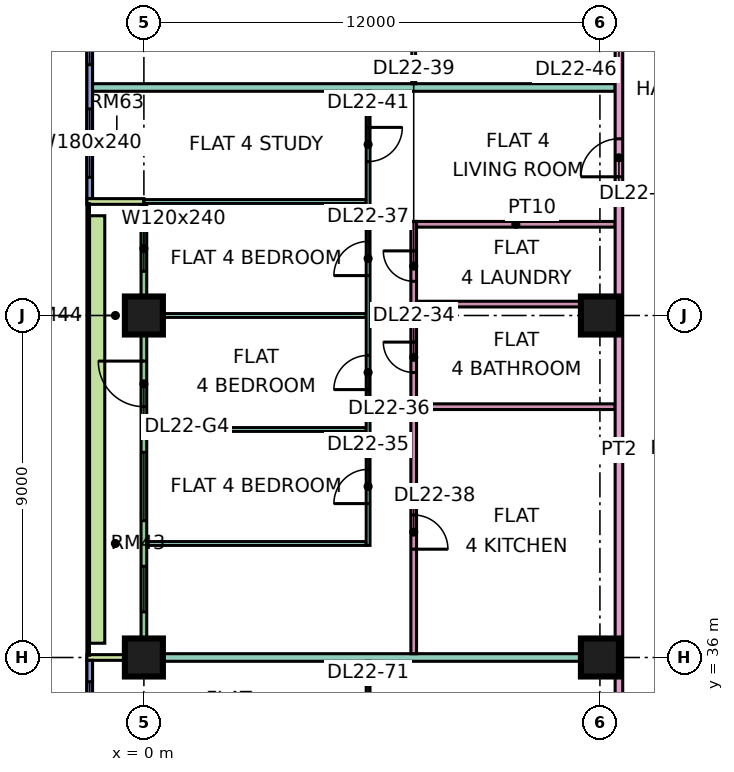
"""IFC4 building model, lengths in metres.
Left out: names, types, materials, properties, quantities, classifications, styles, units other than length and angle.
Written with IfcOpenShell. Run it as: python <this file> out.ifc"""

import sys

from ifc_helpers import new_model, si_unit, direction, frame, frame_2d, origin, origin_2d, place, context, subcontext, project, spatial, rectangle, extrude, element, fill, save


model = new_model("IFC4")
c1 = context("Model", 3, precision=1e-05, world=origin(), true_north=direction((0.0, 1.0)))
c2 = subcontext(c1, "Body", "Model", "MODEL_VIEW")
j1 = project(units=[si_unit("LENGTHUNIT", "METRE"), si_unit("PLANEANGLEUNIT", "RADIAN")], contexts=[c1])
p1 = place(None, origin())
s1 = spatial("IfcSite", under=j1, at=p1, CompositionType="ELEMENT")
p2 = place(p1, origin())
s2 = spatial("IfcBuilding", under=s1, at=p2, CompositionType="ELEMENT")
p3 = place(p2, frame((0.0, 0.0, 99.4)))
s3 = spatial("IfcBuildingStorey", under=s2, at=p3, CompositionType="ELEMENT", Elevation=99.4)
p4 = place(p3, frame((0.0, 36.0, 0.0), z_axis=(0.0, 0.0, 1.0), x_axis=(1.0, 0.0, 0.0)))
e1 = element("IfcColumn", 1, at=p4, inside=s3, PredefinedType="COLUMN", context=c2, shape_type="SweptSolid", body=[
    extrude(rectangle(XDim=1.0, YDim=1.0, at=origin_2d()), origin(), (0.0, 0.0, 1.0), 3.75),
])
for number, where, z_axis, x_axis in (
    (2, (0.0, 45.0, 0.0), (0.0, 0.0, 1.0), (1.0, 0.0, 0.0)),
    (3, (12.0, 36.0, 0.0), (0.0, 0.0, 1.0), (1.0, 0.0, 0.0)),
    (4, (12.0, 45.0, 0.0), (0.0, 0.0, 1.0), (1.0, 0.0, 0.0)),
):
    element("IfcColumn", number, at=place(p3, frame(where, z_axis=z_axis, x_axis=x_axis)), inside=s3, PredefinedType="COLUMN", context=c2, shape_type="SweptSolid", body=[
        extrude(rectangle(XDim=1.0, YDim=1.0, at=origin_2d()), origin(), (0.0, 0.0, 1.0), 3.75),
    ])
p5 = place(p3, frame((-1.425, 61.5, 0.0), z_axis=(0.0, 0.0, 1.0), x_axis=(0.0, -1.0, 0.0)))
e5 = element("IfcWall", 5, at=p5, inside=s3, PredefinedType="SOLIDWALL", context=c2, shape_type="SweptSolid", body=[
    extrude(rectangle(XDim=13.425, YDim=0.15, at=frame_2d((6.712, 0.0))), origin(), (0.0, 0.0, 1.0), 3.35),
])
p6 = place(p5, frame((0.3, 0.0, 0.45)))
e6 = element("IfcOpeningElement", 6, at=p6, cuts=e5, PredefinedType="OPENING", context=c2, shape_type="SweptSolid", body=[
    extrude(rectangle(XDim=0.9, YDim=2.4, at=frame_2d((0.45, 1.2))), frame((0.0, 0.085, 0.0), z_axis=(0.0, -1.0, 0.0), x_axis=(1.0, 0.0, 0.0)), (0.0, 0.0, 1.0), 0.17),
])
p7 = place(p5, frame((2.1, 0.0, 0.45)))
e7 = element("IfcOpeningElement", 7, at=p7, cuts=e5, PredefinedType="OPENING", context=c2, shape_type="SweptSolid", body=[
    extrude(rectangle(XDim=4.8, YDim=2.4, at=frame_2d((2.4, 1.2))), frame((0.0, 0.085, 0.0), z_axis=(0.0, -1.0, 0.0), x_axis=(1.0, 0.0, 0.0)), (0.0, 0.0, 1.0), 0.17),
])
p8 = place(p5, frame((8.1, 0.0, 0.45)))
e8 = element("IfcOpeningElement", 8, at=p8, cuts=e5, PredefinedType="OPENING", context=c2, shape_type="SweptSolid", body=[
    extrude(rectangle(XDim=1.8, YDim=2.4, at=frame_2d((0.9, 1.2))), frame((0.0, 0.085, 0.0), z_axis=(0.0, -1.0, 0.0), x_axis=(1.0, 0.0, 0.0)), (0.0, 0.0, 1.0), 0.17),
])
p9 = place(p5, frame((11.062, 0.0, 0.45)))
e9 = element("IfcOpeningElement", 9, at=p9, cuts=e5, PredefinedType="OPENING", context=c2, shape_type="SweptSolid", body=[
    extrude(rectangle(XDim=1.8, YDim=2.4, at=frame_2d((0.9, 1.2))), frame((0.0, 0.085, 0.0), z_axis=(0.0, -1.0, 0.0), x_axis=(1.0, 0.0, 0.0)), (0.0, 0.0, 1.0), 0.17),
])
p10 = place(p3, frame((0.0, 47.925, 0.0), z_axis=(0.0, 0.0, 1.0), x_axis=(0.0, -1.0, 0.0)))
e10 = element("IfcWall", 10, at=p10, inside=s3, PredefinedType="SOLIDWALL", context=c2, shape_type="SweptSolid", body=[
    extrude(rectangle(XDim=11.85, YDim=0.15, at=frame_2d((5.925, 0.0))), origin(), (0.0, 0.0, 1.0), 3.35),
])
p11 = place(p10, frame((0.562, 0.0, 0.45)))
e11 = element("IfcOpeningElement", 11, at=p11, cuts=e10, PredefinedType="OPENING", context=c2, shape_type="SweptSolid", body=[
    extrude(rectangle(XDim=1.2, YDim=2.4, at=frame_2d((0.6, 1.2))), frame((0.0, 0.085, 0.0), z_axis=(0.0, -1.0, 0.0), x_axis=(1.0, 0.0, 0.0)), (0.0, 0.0, 1.0), 0.17),
])
p12 = place(p10, frame((4.125, 0.0, 0.0)))
e12 = element("IfcOpeningElement", 12, at=p12, cuts=e10, PredefinedType="OPENING", context=c2, shape_type="SweptSolid", body=[
    extrude(rectangle(XDim=1.2, YDim=2.4, at=frame_2d((0.6, 1.2))), frame((0.0, 0.085, 0.0), z_axis=(0.0, -1.0, 0.0), x_axis=(1.0, 0.0, 0.0)), (0.0, 0.0, 1.0), 0.17),
])
p13 = place(p10, frame((6.525, 0.0, 0.45)))
e13 = element("IfcOpeningElement", 13, at=p13, cuts=e10, PredefinedType="OPENING", context=c2, shape_type="SweptSolid", body=[
    extrude(rectangle(XDim=1.8, YDim=2.4, at=frame_2d((0.9, 1.2))), frame((0.0, 0.085, 0.0), z_axis=(0.0, -1.0, 0.0), x_axis=(1.0, 0.0, 0.0)), (0.0, 0.0, 1.0), 0.17),
])
p14 = place(p10, frame((9.525, 0.0, 0.45)))
e14 = element("IfcOpeningElement", 14, at=p14, cuts=e10, PredefinedType="OPENING", context=c2, shape_type="SweptSolid", body=[
    extrude(rectangle(XDim=1.2, YDim=2.4, at=frame_2d((0.6, 1.2))), frame((0.0, 0.085, 0.0), z_axis=(0.0, -1.0, 0.0), x_axis=(1.0, 0.0, 0.0)), (0.0, 0.0, 1.0), 0.17),
])
for number, where, z_axis, x_axis in (
    (15, (-1.5, 48.0, 0.0), (0.0, 0.0, 1.0), (1.0, 0.0, 0.0)),
    (16, (-1.5, 36.0, 0.0), (0.0, 0.0, 1.0), (1.0, 0.0, 0.0)),
):
    element("IfcWall", number, at=place(p3, frame(where, z_axis=z_axis, x_axis=x_axis)), inside=s3, PredefinedType="SOLIDWALL", context=c2, shape_type="SweptSolid", body=[
        extrude(rectangle(XDim=1.5, YDim=0.15, at=frame_2d((0.75, 0.0))), origin(), (0.0, 0.0, 1.0), 3.35),
    ])
p15 = place(p3, frame((-1.425, 35.925, 0.0), z_axis=(0.0, 0.0, 1.0), x_axis=(0.0, -1.0, 0.0)))
e17 = element("IfcWall", 17, at=p15, inside=s3, PredefinedType="SOLIDWALL", context=c2, shape_type="SweptSolid", body=[
    extrude(rectangle(XDim=11.85, YDim=0.15, at=frame_2d((5.925, 0.0))), origin(), (0.0, 0.0, 1.0), 3.35),
])
p16 = place(p15, frame((0.562, 0.0, 0.45)))
e18 = element("IfcOpeningElement", 18, at=p16, cuts=e17, PredefinedType="OPENING", context=c2, shape_type="SweptSolid", body=[
    extrude(rectangle(XDim=1.8, YDim=2.4, at=frame_2d((0.9, 1.2))), frame((0.0, 0.085, 0.0), z_axis=(0.0, -1.0, 0.0), x_axis=(1.0, 0.0, 0.0)), (0.0, 0.0, 1.0), 0.17),
])
p17 = place(p15, frame((3.525, 0.0, 0.45)))
e19 = element("IfcOpeningElement", 19, at=p17, cuts=e17, PredefinedType="OPENING", context=c2, shape_type="SweptSolid", body=[
    extrude(rectangle(XDim=4.8, YDim=2.4, at=frame_2d((2.4, 1.2))), frame((0.0, 0.085, 0.0), z_axis=(0.0, -1.0, 0.0), x_axis=(1.0, 0.0, 0.0)), (0.0, 0.0, 1.0), 0.17),
])
p18 = place(p15, frame((9.488, 0.0, 0.45)))
e20 = element("IfcOpeningElement", 20, at=p18, cuts=e17, PredefinedType="OPENING", context=c2, shape_type="SweptSolid", body=[
    extrude(rectangle(XDim=1.8, YDim=2.4, at=frame_2d((0.9, 1.2))), frame((0.0, 0.085, 0.0), z_axis=(0.0, -1.0, 0.0), x_axis=(1.0, 0.0, 0.0)), (0.0, 0.0, 1.0), 0.17),
])
p19 = place(p3, frame((-1.229, 47.625, 0.0), z_axis=(0.0, 0.0, 1.0), x_axis=(0.0, -1.0, 0.0)))
e21 = element("IfcWall", 21, at=p19, inside=s3, PredefinedType="SOLIDWALL", context=c2, shape_type="SweptSolid", body=[
    extrude(rectangle(XDim=11.25, YDim=0.4, at=frame_2d((5.625, 0.0))), origin(), (0.0, 0.0, 1.0), 0.7),
])
e22 = element("IfcWall", 22, at=p4, inside=s3, PredefinedType="PARTITIONING", context=c2, shape_type="SweptSolid", body=[
    extrude(rectangle(XDim=12.4, YDim=0.2, at=frame_2d((6.2, 0.0))), origin(), (0.0, 0.0, 1.0), 3.35),
])
p20 = place(p3, frame((0.0, 48.0, 0.0), z_axis=(0.0, 0.0, 1.0), x_axis=(1.0, 0.0, 0.0)))
e23 = element("IfcWall", 23, at=p20, inside=s3, PredefinedType="PARTITIONING", context=c2, shape_type="SweptSolid", body=[
    extrude(rectangle(XDim=5.85, YDim=0.1, at=frame_2d((2.925, 0.0))), origin(), (0.0, 0.0, 1.0), 3.35),
])
p21 = place(p3, frame((-1.35, 51.0, 0.0), z_axis=(0.0, 0.0, 1.0), x_axis=(1.0, 0.0, 0.0)))
e24 = element("IfcWall", 24, at=p21, inside=s3, PredefinedType="PARTITIONING", context=c2, shape_type="SweptSolid", body=[
    extrude(rectangle(XDim=13.75, YDim=0.2, at=frame_2d((6.875, 0.0))), origin(), (0.0, 0.0, 1.0), 3.35),
])
for number, where, z_axis, x_axis in (
    (25, (0.074, 39.0, 0.0), (0.0, 0.0, 1.0), (1.0, 0.0, 0.0)),
    (26, (0.074, 42.0, 0.0), (0.0, 0.0, 1.0), (1.0, 0.0, 0.0)),
    (27, (0.074, 45.0, 0.0), (0.0, 0.0, 1.0), (1.0, 0.0, 0.0)),
):
    element("IfcWall", number, at=place(p3, frame(where, z_axis=z_axis, x_axis=x_axis)), inside=s3, PredefinedType="PARTITIONING", context=c2, shape_type="SweptSolid", body=[
        extrude(rectangle(XDim=5.776, YDim=0.1, at=frame_2d((2.888, 0.0))), origin(), (0.0, 0.0, 1.0), 3.35),
    ])
p22 = place(p3, frame((5.9, 33.05, 0.0), z_axis=(0.0, 0.0, 1.0), x_axis=(0.0, 1.0, 0.0)))
e28 = element("IfcWall", 28, at=p22, inside=s3, PredefinedType="PARTITIONING", context=c2, shape_type="SweptSolid", body=[
    extrude(rectangle(XDim=2.85, YDim=0.1, at=frame_2d((1.425, 0.0))), origin(), (0.0, 0.0, 1.0), 3.35),
])
p23 = place(p22, frame((1.0, 0.0, 0.0)))
e29 = element("IfcOpeningElement", 29, at=p23, cuts=e28, PredefinedType="OPENING", context=c2, shape_type="SweptSolid", body=[
    extrude(rectangle(XDim=0.9, YDim=2.1, at=frame_2d((0.45, 1.05))), frame((0.0, 0.06, 0.0), z_axis=(0.0, -1.0, 0.0), x_axis=(1.0, 0.0, 0.0)), (0.0, 0.0, 1.0), 0.12),
])
p24 = place(p3, frame((5.9, 38.95, 0.0), z_axis=(0.0, 0.0, 1.0), x_axis=(0.0, 1.0, 0.0)))
e30 = element("IfcWall", 30, at=p24, inside=s3, PredefinedType="PARTITIONING", context=c2, shape_type="SweptSolid", body=[
    extrude(rectangle(XDim=11.95, YDim=0.1, at=frame_2d((5.975, 0.0))), origin(), (0.0, 0.0, 1.0), 3.35),
])
p25 = place(p24, frame((1.1, 0.0, 0.0)))
e31 = element("IfcOpeningElement", 31, at=p25, cuts=e30, PredefinedType="OPENING", context=c2, shape_type="SweptSolid", body=[
    extrude(rectangle(XDim=0.9, YDim=2.1, at=frame_2d((0.45, 1.05))), frame((0.0, 0.06, 0.0), z_axis=(0.0, -1.0, 0.0), x_axis=(1.0, 0.0, 0.0)), (0.0, 0.0, 1.0), 0.12),
])
p26 = place(p24, frame((4.1, 0.0, 0.0)))
e32 = element("IfcOpeningElement", 32, at=p26, cuts=e30, PredefinedType="OPENING", context=c2, shape_type="SweptSolid", body=[
    extrude(rectangle(XDim=0.9, YDim=2.1, at=frame_2d((0.45, 1.05))), frame((0.0, 0.06, 0.0), z_axis=(0.0, -1.0, 0.0), x_axis=(1.0, 0.0, 0.0)), (0.0, 0.0, 1.0), 0.12),
])
p27 = place(p24, frame((7.1, 0.0, 0.0)))
e33 = element("IfcOpeningElement", 33, at=p27, cuts=e30, PredefinedType="OPENING", context=c2, shape_type="SweptSolid", body=[
    extrude(rectangle(XDim=0.9, YDim=2.1, at=frame_2d((0.45, 1.05))), frame((0.0, 0.06, 0.0), z_axis=(0.0, -1.0, 0.0), x_axis=(1.0, 0.0, 0.0)), (0.0, 0.0, 1.0), 0.12),
])
p28 = place(p24, frame((10.1, 0.0, 0.0)))
e34 = element("IfcOpeningElement", 34, at=p28, cuts=e30, PredefinedType="OPENING", context=c2, shape_type="SweptSolid", body=[
    extrude(rectangle(XDim=0.9, YDim=2.1, at=frame_2d((0.45, 1.05))), frame((0.0, 0.06, 0.0), z_axis=(0.0, -1.0, 0.0), x_axis=(1.0, 0.0, 0.0)), (0.0, 0.0, 1.0), 0.12),
])
p29 = place(p3, frame((7.1, 36.1, 0.0), z_axis=(0.0, 0.0, 1.0), x_axis=(0.0, 1.0, 0.0)))
e35 = element("IfcWall", 35, at=p29, inside=s3, PredefinedType="PARTITIONING", context=c2, shape_type="SweptSolid", body=[
    extrude(rectangle(XDim=11.375, YDim=0.15, at=frame_2d((5.688, 0.0))), origin(), (0.0, 0.0, 1.0), 3.35),
])
p30 = place(p29, frame((7.4, 0.0, 0.0)))
e36 = element("IfcOpeningElement", 36, at=p30, cuts=e35, PredefinedType="OPENING", context=c2, shape_type="SweptSolid", body=[
    extrude(rectangle(XDim=0.8, YDim=2.1, at=frame_2d((0.4, 1.05))), frame((0.0, 0.085, 0.0), z_axis=(0.0, -1.0, 0.0), x_axis=(1.0, 0.0, 0.0)), (0.0, 0.0, 1.0), 0.17),
])
p31 = place(p29, frame((2.75, 0.0, 0.0)))
e37 = element("IfcOpeningElement", 37, at=p31, cuts=e35, PredefinedType="OPENING", context=c2, shape_type="SweptSolid", body=[
    extrude(rectangle(XDim=0.9, YDim=2.1, at=frame_2d((0.45, 1.05))), frame((0.0, 0.085, 0.0), z_axis=(0.0, -1.0, 0.0), x_axis=(1.0, 0.0, 0.0)), (0.0, 0.0, 1.0), 0.17),
])
p32 = place(p29, frame((9.8, 0.0, 0.0)))
e38 = element("IfcOpeningElement", 38, at=p32, cuts=e35, PredefinedType="OPENING", context=c2, shape_type="SweptSolid", body=[
    extrude(rectangle(XDim=0.8, YDim=2.1, at=frame_2d((0.4, 1.05))), frame((0.0, 0.085, 0.0), z_axis=(0.0, -1.0, 0.0), x_axis=(1.0, 0.0, 0.0)), (0.0, 0.0, 1.0), 0.17),
])
p33 = place(p3, frame((7.1, 51.1, 0.0), z_axis=(0.0, 0.0, 1.0), x_axis=(0.0, 1.0, 0.0)))
e39 = element("IfcWall", 39, at=p33, inside=s3, PredefinedType="PARTITIONING", context=c2, shape_type="SweptSolid", body=[
    extrude(rectangle(XDim=2.85, YDim=0.1, at=frame_2d((1.425, 0.0))), origin(), (0.0, 0.0, 1.0), 3.35),
])
p34 = place(p33, frame((0.95, 0.0, 0.0)))
e40 = element("IfcOpeningElement", 40, at=p34, cuts=e39, PredefinedType="OPENING", context=c2, shape_type="SweptSolid", body=[
    extrude(rectangle(XDim=0.9, YDim=2.1, at=frame_2d((0.45, 1.05))), frame((0.0, 0.06, 0.0), z_axis=(0.0, -1.0, 0.0), x_axis=(1.0, 0.0, 0.0)), (0.0, 0.0, 1.0), 0.12),
])
for number, where, z_axis, x_axis in (
    (41, (7.175, 42.6, 0.0), (0.0, 0.0, 1.0), (1.0, 0.0, 0.0)),
    (42, (7.175, 45.3, 0.0), (0.0, 0.0, 1.0), (1.0, 0.0, 0.0)),
    (43, (7.175, 47.4, 0.0), (0.0, 0.0, 1.0), (1.0, 0.0, 0.0)),
):
    element("IfcWall", number, at=place(p3, frame(where, z_axis=z_axis, x_axis=x_axis)), inside=s3, PredefinedType="PARTITIONING", context=c2, shape_type="SweptSolid", body=[
        extrude(rectangle(XDim=5.225, YDim=0.15, at=frame_2d((2.612, 0.0))), origin(), (0.0, 0.0, 1.0), 3.35),
    ])
p35 = place(p3, frame((12.5, 20.0, 0.0), z_axis=(0.0, 0.0, 1.0), x_axis=(0.0, 1.0, 0.0)))
e44 = element("IfcWall", 44, at=p35, inside=s3, PredefinedType="PARTITIONING", context=c2, shape_type="SweptSolid", body=[
    extrude(rectangle(XDim=42.926, YDim=0.2, at=frame_2d((21.463, 0.0))), origin(), (0.0, 0.0, 1.0), 3.35),
])
p36 = place(p35, frame((28.65, 0.0, 0.0)))
e45 = element("IfcOpeningElement", 45, at=p36, cuts=e44, PredefinedType="OPENING", context=c2, shape_type="SweptSolid", body=[
    extrude(rectangle(XDim=1.0, YDim=2.1, at=frame_2d((0.5, 1.05))), frame((0.0, 0.11, 0.0), z_axis=(0.0, -1.0, 0.0), x_axis=(1.0, 0.0, 0.0)), (0.0, 0.0, 1.0), 0.22),
])
p37 = place(p35, frame((32.1, 0.0, 0.0)))
e46 = element("IfcOpeningElement", 46, at=p37, cuts=e44, PredefinedType="OPENING", context=c2, shape_type="SweptSolid", body=[
    extrude(rectangle(XDim=1.0, YDim=2.1, at=frame_2d((0.5, 1.05))), frame((0.0, 0.11, 0.0), z_axis=(0.0, -1.0, 0.0), x_axis=(1.0, 0.0, 0.0)), (0.0, 0.0, 1.0), 0.22),
])
p38 = place(p35, frame((0.6, 0.0, 0.0)))
e47 = element("IfcOpeningElement", 47, at=p38, cuts=e44, PredefinedType="OPENING", context=c2, shape_type="SweptSolid", body=[
    extrude(rectangle(XDim=1.2, YDim=2.1, at=frame_2d((0.6, 1.05))), frame((0.0, 0.11, 0.0), z_axis=(0.0, -1.0, 0.0), x_axis=(1.0, 0.0, 0.0)), (0.0, 0.0, 1.0), 0.22),
])
p39 = place(p35, frame((13.95, 0.0, 0.0)))
e48 = element("IfcOpeningElement", 48, at=p39, cuts=e44, PredefinedType="OPENING", context=c2, shape_type="SweptSolid", body=[
    extrude(rectangle(XDim=1.0, YDim=2.1, at=frame_2d((0.5, 1.05))), frame((0.0, 0.11, 0.0), z_axis=(0.0, -1.0, 0.0), x_axis=(1.0, 0.0, 0.0)), (0.0, 0.0, 1.0), 0.22),
])
p40 = place(p8, origin())
e49 = element("IfcWindow", 49, at=p40, inside=s3, PartitioningType="SINGLE_PANEL", PredefinedType="WINDOW", context=c2, shape_type="SweptSolid", body=[
    extrude(rectangle(XDim=1.8, YDim=2.4, at=frame_2d((0.9, 1.2))), frame((0.0, 0.03, 0.0), z_axis=(0.0, -1.0, 0.0), x_axis=(1.0, 0.0, 0.0)), (0.0, 0.0, 1.0), 0.06),
])
fill(e8, e49)
p41 = place(p9, origin())
e50 = element("IfcWindow", 50, at=p41, inside=s3, PartitioningType="SINGLE_PANEL", PredefinedType="WINDOW", context=c2, shape_type="SweptSolid", body=[
    extrude(rectangle(XDim=1.8, YDim=2.4, at=frame_2d((0.9, 1.2))), frame((0.0, 0.03, 0.0), z_axis=(0.0, -1.0, 0.0), x_axis=(1.0, 0.0, 0.0)), (0.0, 0.0, 1.0), 0.06),
])
fill(e9, e50)
p42 = place(p11, origin())
e51 = element("IfcWindow", 51, at=p42, inside=s3, PartitioningType="SINGLE_PANEL", PredefinedType="WINDOW", context=c2, shape_type="SweptSolid", body=[
    extrude(rectangle(XDim=1.2, YDim=2.4, at=frame_2d((0.6, 1.2))), frame((0.0, 0.03, 0.0), z_axis=(0.0, -1.0, 0.0), x_axis=(1.0, 0.0, 0.0)), (0.0, 0.0, 1.0), 0.06),
])
fill(e11, e51)
p43 = place(p12, frame((1.2, 0.0, 0.0), z_axis=(0.0, 0.0, 1.0), x_axis=(-1.0, 0.0, 0.0)))
e52 = element("IfcDoor", 52, at=p43, inside=s3, OperationType="DOUBLE_DOOR_SINGLE_SWING", PredefinedType="DOOR", context=c2, shape_type="SweptSolid", body=[
    extrude(rectangle(XDim=1.2, YDim=2.4, at=frame_2d((0.6, 1.2))), frame((0.0, 0.025, 0.0), z_axis=(0.0, -1.0, 0.0), x_axis=(1.0, 0.0, 0.0)), (0.0, 0.0, 1.0), 0.05),
])
fill(e12, e52)
p44 = place(p13, origin())
e53 = element("IfcWindow", 53, at=p44, inside=s3, PartitioningType="SINGLE_PANEL", PredefinedType="WINDOW", context=c2, shape_type="SweptSolid", body=[
    extrude(rectangle(XDim=1.8, YDim=2.4, at=frame_2d((0.9, 1.2))), frame((0.0, 0.03, 0.0), z_axis=(0.0, -1.0, 0.0), x_axis=(1.0, 0.0, 0.0)), (0.0, 0.0, 1.0), 0.06),
])
fill(e13, e53)
p45 = place(p14, origin())
e54 = element("IfcWindow", 54, at=p45, inside=s3, PartitioningType="SINGLE_PANEL", PredefinedType="WINDOW", context=c2, shape_type="SweptSolid", body=[
    extrude(rectangle(XDim=1.2, YDim=2.4, at=frame_2d((0.6, 1.2))), frame((0.0, 0.03, 0.0), z_axis=(0.0, -1.0, 0.0), x_axis=(1.0, 0.0, 0.0)), (0.0, 0.0, 1.0), 0.06),
])
fill(e14, e54)
p46 = place(p16, origin())
e55 = element("IfcWindow", 55, at=p46, inside=s3, PartitioningType="SINGLE_PANEL", PredefinedType="WINDOW", context=c2, shape_type="SweptSolid", body=[
    extrude(rectangle(XDim=1.8, YDim=2.4, at=frame_2d((0.9, 1.2))), frame((0.0, 0.03, 0.0), z_axis=(0.0, -1.0, 0.0), x_axis=(1.0, 0.0, 0.0)), (0.0, 0.0, 1.0), 0.06),
])
fill(e18, e55)
p47 = place(p30, frame((0.8, 0.0, 0.0), z_axis=(0.0, 0.0, 1.0), x_axis=(-1.0, 0.0, 0.0)))
e56 = element("IfcDoor", 56, at=p47, inside=s3, OperationType="SINGLE_SWING_RIGHT", PredefinedType="DOOR", context=c2, shape_type="SweptSolid", body=[
    extrude(rectangle(XDim=0.8, YDim=2.1, at=frame_2d((0.4, 1.05))), frame((0.0, 0.025, 0.0), z_axis=(0.0, -1.0, 0.0), x_axis=(1.0, 0.0, 0.0)), (0.0, 0.0, 1.0), 0.05),
])
fill(e36, e56)
p48 = place(p25, origin())
e57 = element("IfcDoor", 57, at=p48, inside=s3, OperationType="SINGLE_SWING_LEFT", PredefinedType="DOOR", context=c2, shape_type="SweptSolid", body=[
    extrude(rectangle(XDim=0.9, YDim=2.1, at=frame_2d((0.45, 1.05))), frame((0.0, 0.025, 0.0), z_axis=(0.0, -1.0, 0.0), x_axis=(1.0, 0.0, 0.0)), (0.0, 0.0, 1.0), 0.05),
])
fill(e31, e57)
p49 = place(p26, origin())
e58 = element("IfcDoor", 58, at=p49, inside=s3, OperationType="SINGLE_SWING_LEFT", PredefinedType="DOOR", context=c2, shape_type="SweptSolid", body=[
    extrude(rectangle(XDim=0.9, YDim=2.1, at=frame_2d((0.45, 1.05))), frame((0.0, 0.025, 0.0), z_axis=(0.0, -1.0, 0.0), x_axis=(1.0, 0.0, 0.0)), (0.0, 0.0, 1.0), 0.05),
])
fill(e32, e58)
p50 = place(p27, origin())
e59 = element("IfcDoor", 59, at=p50, inside=s3, OperationType="SINGLE_SWING_LEFT", PredefinedType="DOOR", context=c2, shape_type="SweptSolid", body=[
    extrude(rectangle(XDim=0.9, YDim=2.1, at=frame_2d((0.45, 1.05))), frame((0.0, 0.025, 0.0), z_axis=(0.0, -1.0, 0.0), x_axis=(1.0, 0.0, 0.0)), (0.0, 0.0, 1.0), 0.05),
])
fill(e33, e59)
p51 = place(p31, frame((0.9, 0.0, 0.0), z_axis=(0.0, 0.0, 1.0), x_axis=(-1.0, 0.0, 0.0)))
e60 = element("IfcDoor", 60, at=p51, inside=s3, OperationType="SINGLE_SWING_LEFT", PredefinedType="DOOR", context=c2, shape_type="SweptSolid", body=[
    extrude(rectangle(XDim=0.9, YDim=2.1, at=frame_2d((0.45, 1.05))), frame((0.0, 0.025, 0.0), z_axis=(0.0, -1.0, 0.0), x_axis=(1.0, 0.0, 0.0)), (0.0, 0.0, 1.0), 0.05),
])
fill(e37, e60)
p52 = place(p32, frame((0.8, 0.0, 0.0), z_axis=(0.0, 0.0, 1.0), x_axis=(-1.0, 0.0, 0.0)))
e61 = element("IfcDoor", 61, at=p52, inside=s3, OperationType="SINGLE_SWING_RIGHT", PredefinedType="DOOR", context=c2, shape_type="SweptSolid", body=[
    extrude(rectangle(XDim=0.8, YDim=2.1, at=frame_2d((0.4, 1.05))), frame((0.0, 0.025, 0.0), z_axis=(0.0, -1.0, 0.0), x_axis=(1.0, 0.0, 0.0)), (0.0, 0.0, 1.0), 0.05),
])
fill(e38, e61)
p53 = place(p36, origin())
e62 = element("IfcDoor", 62, at=p53, inside=s3, OperationType="SINGLE_SWING_LEFT", PredefinedType="DOOR", context=c2, shape_type="SweptSolid", body=[
    extrude(rectangle(XDim=1.0, YDim=2.1, at=frame_2d((0.5, 1.05))), frame((0.0, 0.025, 0.0), z_axis=(0.0, -1.0, 0.0), x_axis=(1.0, 0.0, 0.0)), (0.0, 0.0, 1.0), 0.05),
])
fill(e45, e62)
p54 = place(p28, origin())
e63 = element("IfcDoor", 63, at=p54, inside=s3, OperationType="SINGLE_SWING_RIGHT", PredefinedType="DOOR", context=c2, shape_type="SweptSolid", body=[
    extrude(rectangle(XDim=0.9, YDim=2.1, at=frame_2d((0.45, 1.05))), frame((0.0, 0.025, 0.0), z_axis=(0.0, -1.0, 0.0), x_axis=(1.0, 0.0, 0.0)), (0.0, 0.0, 1.0), 0.05),
])
fill(e34, e63)
save(model, sys.argv[1])
